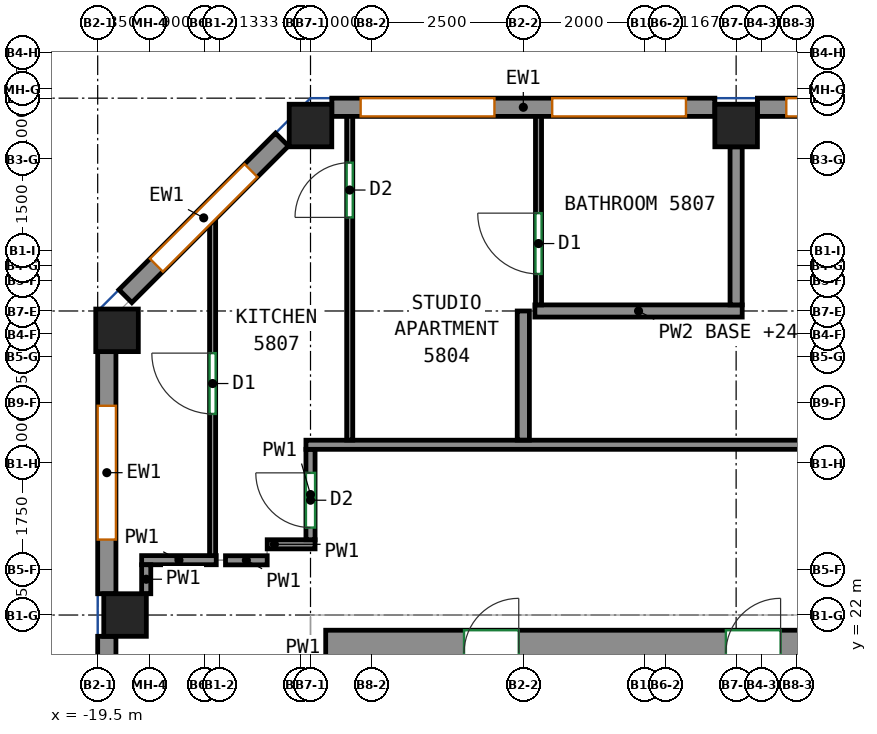
"""IFC4 building model, lengths in metres.
Left out: names, types, materials, properties, quantities, classifications, styles, units other than length and angle.
Written with IfcOpenShell. Run it as: python <this file> out.ifc"""

import sys

from ifc_helpers import new_model, si_unit, direction, frame, frame_2d, origin, origin_2d, place, context, subcontext, project, spatial, rectangle, extrude, source, transform, mapped, element, fill, save


model = new_model("IFC4")
c1 = context("Model", 3, precision=1e-05, world=origin(), true_north=direction((0.0, 1.0)))
c2 = subcontext(c1, "Body", "Model", "MODEL_VIEW")
j1 = project(units=[si_unit("LENGTHUNIT", "METRE"), si_unit("PLANEANGLEUNIT", "RADIAN")], contexts=[c1])
p1 = place(None, origin())
s1 = spatial("IfcSite", under=j1, at=p1, CompositionType="ELEMENT")
p2 = place(p1, origin())
s2 = spatial("IfcBuilding", under=s1, at=p2, CompositionType="ELEMENT")
p3 = place(p2, frame((0.0, 0.0, 242.4)))
s3 = spatial("IfcBuildingStorey", under=s2, at=p3, CompositionType="ELEMENT", Elevation=242.4)
m1 = source(origin(), c2, "Body", "SweptSolid", [
    extrude(rectangle(XDim=0.7, YDim=0.7, at=origin_2d()), origin(), (0.0, 0.0, 1.0), 3.12),
])
for number, where, z_axis, x_axis in (
    (1, (-19.182, 26.682, 0.0), (0.0, 0.0, 1.0), (1.0, 0.0, 0.0)),
    (2, (-19.05, 22.0, 0.0), (0.0, 0.0, 1.0), (1.0, 0.0, 0.0)),
    (3, (-16.0, 30.05, 0.0), (0.0, 0.0, 1.0), (1.0, 0.0, 0.0)),
    (4, (-9.0, 30.05, 0.0), (0.0, 0.0, 1.0), (1.0, 0.0, 0.0)),
):
    element("IfcColumn", number, at=place(p3, frame(where, z_axis=z_axis, x_axis=x_axis)), inside=s3, PredefinedType="COLUMN", context=c2, shape_type="MappedRepresentation", body=[
        mapped(m1, transform((0.0, 0.0, 0.0))),
    ])
m2 = source(origin(), c2, "Body", "SweptSolid", [
    extrude(rectangle(XDim=33.6, YDim=0.75, at=frame_2d((16.8, 0.0))), origin(), (0.0, 0.0, 1.0), 3.12),
])
p4 = place(p3, frame((-15.75, 21.375, 0.0), z_axis=(0.0, 0.0, 1.0), x_axis=(1.0, 0.0, 0.0)))
e5 = element("IfcWall", 5, at=p4, inside=s3, PredefinedType="SHEAR", context=c2, shape_type="MappedRepresentation", body=[
    mapped(m2, transform((0.0, 0.0, 0.0))),
])
p5 = place(p4, frame((6.581, 0.0, 0.0)))
e6 = element("IfcOpeningElement", 6, at=p5, cuts=e5, PredefinedType="OPENING", context=c2, shape_type="SweptSolid", body=[
    extrude(rectangle(XDim=0.9, YDim=2.1, at=frame_2d((0.45, 1.05))), frame((0.0, 0.385, 0.0), z_axis=(0.0, -1.0, 0.0), x_axis=(1.0, 0.0, 0.0)), (0.0, 0.0, 1.0), 0.77),
])
p6 = place(p4, frame((11.888, 0.0, 0.0)))
e7 = element("IfcOpeningElement", 7, at=p6, cuts=e5, PredefinedType="OPENING", context=c2, shape_type="SweptSolid", body=[
    extrude(rectangle(XDim=0.9, YDim=2.1, at=frame_2d((0.45, 1.05))), frame((0.0, 0.385, 0.0), z_axis=(0.0, -1.0, 0.0), x_axis=(1.0, 0.0, 0.0)), (0.0, 0.0, 1.0), 0.77),
])
p7 = place(p4, frame((17.315, 0.0, 0.0)))
e8 = element("IfcOpeningElement", 8, at=p7, cuts=e5, PredefinedType="OPENING", context=c2, shape_type="SweptSolid", body=[
    extrude(rectangle(XDim=0.9, YDim=2.1, at=frame_2d((0.45, 1.05))), frame((0.0, 0.385, 0.0), z_axis=(0.0, -1.0, 0.0), x_axis=(1.0, 0.0, 0.0)), (0.0, 0.0, 1.0), 0.77),
])
p8 = place(p4, frame((21.536, 0.0, 0.0)))
e9 = element("IfcOpeningElement", 9, at=p8, cuts=e5, PredefinedType="OPENING", context=c2, shape_type="SweptSolid", body=[
    extrude(rectangle(XDim=0.9, YDim=2.1, at=frame_2d((0.45, 1.05))), frame((0.0, 0.385, 0.0), z_axis=(0.0, -1.0, 0.0), x_axis=(1.0, 0.0, 0.0)), (0.0, 0.0, 1.0), 0.77),
])
p9 = place(p4, frame((24.537, 0.0, 0.0)))
e10 = element("IfcOpeningElement", 10, at=p9, cuts=e5, PredefinedType="OPENING", context=c2, shape_type="SweptSolid", body=[
    extrude(rectangle(XDim=0.9, YDim=2.1, at=frame_2d((0.45, 1.05))), frame((0.0, 0.385, 0.0), z_axis=(0.0, -1.0, 0.0), x_axis=(1.0, 0.0, 0.0)), (0.0, 0.0, 1.0), 0.77),
])
p10 = place(p4, frame((27.07, 0.0, 0.0)))
e11 = element("IfcOpeningElement", 11, at=p10, cuts=e5, PredefinedType="OPENING", context=c2, shape_type="SweptSolid", body=[
    extrude(rectangle(XDim=0.9, YDim=2.1, at=frame_2d((0.45, 1.05))), frame((0.0, 0.385, 0.0), z_axis=(0.0, -1.0, 0.0), x_axis=(1.0, 0.0, 0.0)), (0.0, 0.0, 1.0), 0.77),
])
p11 = place(p4, frame((2.275, 0.0, 0.0)))
e12 = element("IfcOpeningElement", 12, at=p11, cuts=e5, PredefinedType="OPENING", context=c2, shape_type="SweptSolid", body=[
    extrude(rectangle(XDim=0.9, YDim=2.1, at=frame_2d((0.45, 1.05))), frame((0.0, 0.385, 0.0), z_axis=(0.0, -1.0, 0.0), x_axis=(1.0, 0.0, 0.0)), (0.0, 0.0, 1.0), 0.77),
])
p12 = place(p4, frame((30.425, 0.0, 0.0)))
e13 = element("IfcOpeningElement", 13, at=p12, cuts=e5, PredefinedType="OPENING", context=c2, shape_type="SweptSolid", body=[
    extrude(rectangle(XDim=0.9, YDim=2.1, at=frame_2d((0.45, 1.05))), frame((0.0, 0.385, 0.0), z_axis=(0.0, -1.0, 0.0), x_axis=(1.0, 0.0, 0.0)), (0.0, 0.0, 1.0), 0.77),
])
m3 = source(origin(), c2, "Body", "SweptSolid", [
    extrude(rectangle(XDim=6.3, YDim=0.3, at=frame_2d((3.15, 0.0))), origin(), (0.0, 0.0, 1.0), 3.12),
])
p13 = place(p3, frame((-2.35, 30.35, 0.0), z_axis=(0.0, 0.0, 1.0), x_axis=(-1.0, 0.0, 0.0)))
e14 = element("IfcWall", 14, at=p13, inside=s3, PredefinedType="SOLIDWALL", context=c2, shape_type="MappedRepresentation", body=[
    mapped(m3, transform((0.0, 0.0, 0.0))),
])
p14 = place(p13, frame((0.475, 0.0, 0.8)))
e15 = element("IfcOpeningElement", 15, at=p14, cuts=e14, PredefinedType="OPENING", context=c2, shape_type="SweptSolid", body=[
    extrude(rectangle(XDim=2.2, YDim=2.05, at=frame_2d((1.1, 1.025))), frame((0.0, 0.16, 0.0), z_axis=(0.0, -1.0, 0.0), x_axis=(1.0, 0.0, 0.0)), (0.0, 0.0, 1.0), 0.32),
])
p15 = place(p13, frame((3.625, 0.0, 0.8)))
e16 = element("IfcOpeningElement", 16, at=p15, cuts=e14, PredefinedType="OPENING", context=c2, shape_type="SweptSolid", body=[
    extrude(rectangle(XDim=2.2, YDim=2.05, at=frame_2d((1.1, 1.025))), frame((0.0, 0.16, 0.0), z_axis=(0.0, -1.0, 0.0), x_axis=(1.0, 0.0, 0.0)), (0.0, 0.0, 1.0), 0.32),
])
p16 = place(p3, frame((-9.35, 30.35, 0.0), z_axis=(0.0, 0.0, 1.0), x_axis=(-1.0, 0.0, 0.0)))
e17 = element("IfcWall", 17, at=p16, inside=s3, PredefinedType="SOLIDWALL", context=c2, shape_type="MappedRepresentation", body=[
    mapped(m3, transform((0.0, 0.0, 0.0))),
])
p17 = place(p16, frame((0.475, 0.0, 0.8)))
e18 = element("IfcOpeningElement", 18, at=p17, cuts=e17, PredefinedType="OPENING", context=c2, shape_type="SweptSolid", body=[
    extrude(rectangle(XDim=2.2, YDim=2.05, at=frame_2d((1.1, 1.025))), frame((0.0, 0.16, 0.0), z_axis=(0.0, -1.0, 0.0), x_axis=(1.0, 0.0, 0.0)), (0.0, 0.0, 1.0), 0.32),
])
p18 = place(p16, frame((3.625, 0.0, 0.8)))
e19 = element("IfcOpeningElement", 19, at=p18, cuts=e17, PredefinedType="OPENING", context=c2, shape_type="SweptSolid", body=[
    extrude(rectangle(XDim=2.2, YDim=2.05, at=frame_2d((1.1, 1.025))), frame((0.0, 0.16, 0.0), z_axis=(0.0, -1.0, 0.0), x_axis=(1.0, 0.0, 0.0)), (0.0, 0.0, 1.0), 0.32),
])
m4 = source(origin(), c2, "Body", "SweptSolid", [
    extrude(rectangle(XDim=3.642, YDim=0.3, at=frame_2d((1.821, 0.0))), origin(), (0.0, 0.0, 1.0), 3.12),
])
p19 = place(p3, frame((-16.469, 29.819, 0.0), z_axis=(0.0, 0.0, 1.0), x_axis=(-0.707106781187, -0.707106781187, 0.0)))
e20 = element("IfcWall", 20, at=p19, inside=s3, PredefinedType="SOLIDWALL", context=c2, shape_type="MappedRepresentation", body=[
    mapped(m4, transform((0.0, 0.0, 0.0))),
])
p20 = place(p19, frame((0.721, 0.0, 0.8)))
e21 = element("IfcOpeningElement", 21, at=p20, cuts=e20, PredefinedType="OPENING", context=c2, shape_type="SweptSolid", body=[
    extrude(rectangle(XDim=2.2, YDim=2.05, at=frame_2d((1.1, 1.025))), frame((0.0, 0.16, 0.0), z_axis=(0.0, -1.0, 0.0), x_axis=(1.0, 0.0, 0.0)), (0.0, 0.0, 1.0), 0.32),
])
m5 = source(origin(), c2, "Body", "SweptSolid", [
    extrude(rectangle(XDim=3.982, YDim=0.3, at=frame_2d((1.991, 0.0))), origin(), (0.0, 0.0, 1.0), 3.12),
])
p21 = place(p3, frame((-19.35, 26.332, 0.0), z_axis=(0.0, 0.0, 1.0), x_axis=(0.0, -1.0, 0.0)))
e22 = element("IfcWall", 22, at=p21, inside=s3, PredefinedType="SOLIDWALL", context=c2, shape_type="MappedRepresentation", body=[
    mapped(m5, transform((0.0, 0.0, 0.0))),
])
p22 = place(p21, frame((0.891, 0.0, 0.8)))
e23 = element("IfcOpeningElement", 23, at=p22, cuts=e22, PredefinedType="OPENING", context=c2, shape_type="SweptSolid", body=[
    extrude(rectangle(XDim=2.2, YDim=2.05, at=frame_2d((1.1, 1.025))), frame((0.0, 0.16, 0.0), z_axis=(0.0, -1.0, 0.0), x_axis=(1.0, 0.0, 0.0)), (0.0, 0.0, 1.0), 0.32),
])
m6 = source(origin(), c2, "Body", "SweptSolid", [
    extrude(rectangle(XDim=13.3, YDim=0.3, at=frame_2d((6.65, 0.0))), origin(), (0.0, 0.0, 1.0), 3.12),
])
p23 = place(p3, frame((-19.35, 21.65, 0.0), z_axis=(0.0, 0.0, 1.0), x_axis=(0.0, -1.0, 0.0)))
e24 = element("IfcWall", 24, at=p23, inside=s3, PredefinedType="SOLIDWALL", context=c2, shape_type="MappedRepresentation", body=[
    mapped(m6, transform((0.0, 0.0, 0.0))),
])
p24 = place(p23, frame((0.562, 0.0, 0.8)))
e25 = element("IfcOpeningElement", 25, at=p24, cuts=e24, PredefinedType="OPENING", context=c2, shape_type="SweptSolid", body=[
    extrude(rectangle(XDim=2.2, YDim=2.05, at=frame_2d((1.1, 1.025))), frame((0.0, 0.16, 0.0), z_axis=(0.0, -1.0, 0.0), x_axis=(1.0, 0.0, 0.0)), (0.0, 0.0, 1.0), 0.32),
])
p25 = place(p23, frame((3.887, 0.0, 0.8)))
e26 = element("IfcOpeningElement", 26, at=p25, cuts=e24, PredefinedType="OPENING", context=c2, shape_type="SweptSolid", body=[
    extrude(rectangle(XDim=2.2, YDim=2.05, at=frame_2d((1.1, 1.025))), frame((0.0, 0.16, 0.0), z_axis=(0.0, -1.0, 0.0), x_axis=(1.0, 0.0, 0.0)), (0.0, 0.0, 1.0), 0.32),
])
p26 = place(p23, frame((7.212, 0.0, 0.8)))
e27 = element("IfcOpeningElement", 27, at=p26, cuts=e24, PredefinedType="OPENING", context=c2, shape_type="SweptSolid", body=[
    extrude(rectangle(XDim=2.2, YDim=2.05, at=frame_2d((1.1, 1.025))), frame((0.0, 0.16, 0.0), z_axis=(0.0, -1.0, 0.0), x_axis=(1.0, 0.0, 0.0)), (0.0, 0.0, 1.0), 0.32),
])
p27 = place(p23, frame((10.538, 0.0, 0.8)))
e28 = element("IfcOpeningElement", 28, at=p27, cuts=e24, PredefinedType="OPENING", context=c2, shape_type="SweptSolid", body=[
    extrude(rectangle(XDim=2.2, YDim=2.05, at=frame_2d((1.1, 1.025))), frame((0.0, 0.16, 0.0), z_axis=(0.0, -1.0, 0.0), x_axis=(1.0, 0.0, 0.0)), (0.0, 0.0, 1.0), 0.32),
])
p28 = place(p3, frame((-17.55, 22.902, 0.0), z_axis=(0.0, 0.0, 1.0), x_axis=(-1.0, 0.0, 0.0)))
e29 = element("IfcWall", 29, at=p28, inside=s3, PredefinedType="PARTITIONING", context=c2, shape_type="SweptSolid", body=[
    extrude(rectangle(XDim=1.227, YDim=0.15, at=frame_2d((0.614, 0.0))), origin(), (0.0, 0.0, 1.0), 3.12),
])
p29 = place(p3, frame((-18.702, 22.827, 0.0), z_axis=(0.0, 0.0, 1.0), x_axis=(0.0, -1.0, 0.0)))
e30 = element("IfcWall", 30, at=p29, inside=s3, PredefinedType="PARTITIONING", context=c2, shape_type="SweptSolid", body=[
    extrude(rectangle(XDim=0.477, YDim=0.15, at=frame_2d((0.238, 0.0))), origin(), (0.0, 0.0, 1.0), 3.12),
])
p30 = place(p3, frame((-16.712, 22.9, 0.0), z_axis=(0.0, 0.0, 1.0), x_axis=(-1.0, 0.0, 0.0)))
e31 = element("IfcWall", 31, at=p30, inside=s3, PredefinedType="PARTITIONING", context=c2, shape_type="SweptSolid", body=[
    extrude(rectangle(XDim=0.686, YDim=0.15, at=frame_2d((0.343, 0.0))), origin(), (0.0, 0.0, 1.0), 3.12),
])
p31 = place(p3, frame((-15.925, 23.163, 0.0), z_axis=(0.0, 0.0, 1.0), x_axis=(-1.0, 0.0, 0.0)))
e32 = element("IfcWall", 32, at=p31, inside=s3, PredefinedType="PARTITIONING", context=c2, shape_type="SweptSolid", body=[
    extrude(rectangle(XDim=0.787, YDim=0.15, at=frame_2d((0.394, 0.0))), origin(), (0.0, 0.0, 1.0), 3.12),
])
p32 = place(p3, frame((-16.0, 23.238, 0.0), z_axis=(0.0, 0.0, 1.0), x_axis=(0.0, 1.0, 0.0)))
e33 = element("IfcWall", 33, at=p32, inside=s3, PredefinedType="PARTITIONING", context=c2, shape_type="SweptSolid", body=[
    extrude(rectangle(XDim=1.487, YDim=0.15, at=frame_2d((0.744, 0.0))), origin(), (0.0, 0.0, 1.0), 3.12),
])
p33 = place(p32, frame((0.2, 0.0, 0.0)))
e34 = element("IfcOpeningElement", 34, at=p33, cuts=e33, PredefinedType="OPENING", context=c2, shape_type="SweptSolid", body=[
    extrude(rectangle(XDim=0.9, YDim=2.1, at=frame_2d((0.45, 1.05))), frame((0.0, 0.085, 0.0), z_axis=(0.0, -1.0, 0.0), x_axis=(1.0, 0.0, 0.0)), (0.0, 0.0, 1.0), 0.17),
])
p34 = place(p3, frame((-16.075, 24.8, 0.0), z_axis=(0.0, 0.0, 1.0), x_axis=(1.0, 0.0, 0.0)))
e35 = element("IfcWall", 35, at=p34, inside=s3, PredefinedType="PARTITIONING", context=c2, shape_type="SweptSolid", body=[
    extrude(rectangle(XDim=36.073, YDim=0.15, at=frame_2d((18.037, 0.0))), origin(), (0.0, 0.0, 1.0), 3.12),
])
p35 = place(p34, frame((14.274, 0.0, 0.0)))
e36 = element("IfcOpeningElement", 36, at=p35, cuts=e35, PredefinedType="OPENING", context=c2, shape_type="SweptSolid", body=[
    extrude(rectangle(XDim=0.9, YDim=2.1, at=frame_2d((0.45, 1.05))), frame((0.0, 0.085, 0.0), z_axis=(0.0, -1.0, 0.0), x_axis=(1.0, 0.0, 0.0)), (0.0, 0.0, 1.0), 0.17),
])
p36 = place(p34, frame((28.875, 0.0, 0.0)))
e37 = element("IfcOpeningElement", 37, at=p36, cuts=e35, PredefinedType="OPENING", context=c2, shape_type="SweptSolid", body=[
    extrude(rectangle(XDim=1.0, YDim=2.1, at=frame_2d((0.5, 1.05))), frame((0.0, 0.085, 0.0), z_axis=(0.0, -1.0, 0.0), x_axis=(1.0, 0.0, 0.0)), (0.0, 0.0, 1.0), 0.17),
])
p37 = place(p3, frame((-12.5, 27.0, 0.0), z_axis=(0.0, 0.0, 1.0), x_axis=(0.0, -1.0, 0.0)))
e38 = element("IfcWall", 38, at=p37, inside=s3, PredefinedType="PARTITIONING", context=c2, shape_type="SweptSolid", body=[
    extrude(rectangle(XDim=2.123, YDim=0.2, at=frame_2d((1.062, 0.0))), origin(), (0.0, 0.0, 1.0), 3.12),
])
p38 = place(p3, frame((-8.9, 27.0, 0.0), z_axis=(0.0, 0.0, 1.0), x_axis=(-1.0, 0.0, 0.0)))
e39 = element("IfcWall", 39, at=p38, inside=s3, PredefinedType="PARTITIONING", context=c2, shape_type="SweptSolid", body=[
    extrude(rectangle(XDim=3.41, YDim=0.2, at=frame_2d((1.705, 0.0))), origin(), (0.0, 0.0, 1.0), 2.57),
])
p39 = place(p3, frame((-9.0, 27.1, 0.0), z_axis=(0.0, 0.0, 1.0), x_axis=(0.0, 1.0, 0.0)))
e40 = element("IfcWall", 40, at=p39, inside=s3, PredefinedType="PARTITIONING", context=c2, shape_type="SweptSolid", body=[
    extrude(rectangle(XDim=2.6, YDim=0.2, at=frame_2d((1.3, 0.0))), origin(), (0.0, 0.0, 1.0), 3.12),
])
p40 = place(p3, frame((-17.61, 22.977, 0.0), z_axis=(0.0, 0.0, 1.0), x_axis=(0.0, 1.0, 0.0)))
e41 = element("IfcWall", 41, at=p40, inside=s3, PredefinedType="PARTITIONING", context=c2, shape_type="SweptSolid", body=[
    extrude(rectangle(XDim=5.559, YDim=0.1, at=frame_2d((2.779, 0.0))), origin(), (0.0, 0.0, 1.0), 3.12),
])
p41 = place(p40, frame((2.33, 0.0, 0.0)))
e42 = element("IfcOpeningElement", 42, at=p41, cuts=e41, PredefinedType="OPENING", context=c2, shape_type="SweptSolid", body=[
    extrude(rectangle(XDim=1.0, YDim=2.1, at=frame_2d((0.5, 1.05))), frame((0.0, 0.06, 0.0), z_axis=(0.0, -1.0, 0.0), x_axis=(1.0, 0.0, 0.0)), (0.0, 0.0, 1.0), 0.12),
])
p42 = place(p3, frame((-15.355, 24.877, 0.0), z_axis=(0.0, 0.0, 1.0), x_axis=(0.0, 1.0, 0.0)))
e43 = element("IfcWall", 43, at=p42, inside=s3, PredefinedType="PARTITIONING", context=c2, shape_type="SweptSolid", body=[
    extrude(rectangle(XDim=5.373, YDim=0.1, at=frame_2d((2.687, 0.0))), origin(), (0.0, 0.0, 1.0), 3.12),
])
p43 = place(p42, frame((3.662, 0.0, 0.0)))
e44 = element("IfcOpeningElement", 44, at=p43, cuts=e43, PredefinedType="OPENING", context=c2, shape_type="SweptSolid", body=[
    extrude(rectangle(XDim=0.9, YDim=2.1, at=frame_2d((0.45, 1.05))), frame((0.0, 0.06, 0.0), z_axis=(0.0, -1.0, 0.0), x_axis=(1.0, 0.0, 0.0)), (0.0, 0.0, 1.0), 0.12),
])
p44 = place(p3, frame((-12.25, 27.1, 0.0), z_axis=(0.0, 0.0, 1.0), x_axis=(0.0, 1.0, 0.0)))
e45 = element("IfcWall", 45, at=p44, inside=s3, PredefinedType="PARTITIONING", context=c2, shape_type="SweptSolid", body=[
    extrude(rectangle(XDim=3.15, YDim=0.1, at=frame_2d((1.575, 0.0))), origin(), (0.0, 0.0, 1.0), 3.12),
])
p45 = place(p44, frame((0.509, 0.0, 0.0)))
e46 = element("IfcOpeningElement", 46, at=p45, cuts=e45, PredefinedType="OPENING", context=c2, shape_type="SweptSolid", body=[
    extrude(rectangle(XDim=1.0, YDim=2.1, at=frame_2d((0.5, 1.05))), frame((0.0, 0.06, 0.0), z_axis=(0.0, -1.0, 0.0), x_axis=(1.0, 0.0, 0.0)), (0.0, 0.0, 1.0), 0.12),
])
p46 = place(p15, origin())
e47 = element("IfcWindow", 47, at=p46, inside=s3, PartitioningType="SINGLE_PANEL", PredefinedType="WINDOW", context=c2, shape_type="SweptSolid", body=[
    extrude(rectangle(XDim=2.2, YDim=2.05, at=frame_2d((1.1, 1.025))), frame((0.0, 0.03, 0.0), z_axis=(0.0, -1.0, 0.0), x_axis=(1.0, 0.0, 0.0)), (0.0, 0.0, 1.0), 0.06),
])
fill(e16, e47)
p47 = place(p17, origin())
e48 = element("IfcWindow", 48, at=p47, inside=s3, PartitioningType="SINGLE_PANEL", PredefinedType="WINDOW", context=c2, shape_type="SweptSolid", body=[
    extrude(rectangle(XDim=2.2, YDim=2.05, at=frame_2d((1.1, 1.025))), frame((0.0, 0.03, 0.0), z_axis=(0.0, -1.0, 0.0), x_axis=(1.0, 0.0, 0.0)), (0.0, 0.0, 1.0), 0.06),
])
fill(e18, e48)
p48 = place(p18, origin())
e49 = element("IfcWindow", 49, at=p48, inside=s3, PartitioningType="SINGLE_PANEL", PredefinedType="WINDOW", context=c2, shape_type="SweptSolid", body=[
    extrude(rectangle(XDim=2.2, YDim=2.05, at=frame_2d((1.1, 1.025))), frame((0.0, 0.03, 0.0), z_axis=(0.0, -1.0, 0.0), x_axis=(1.0, 0.0, 0.0)), (0.0, 0.0, 1.0), 0.06),
])
fill(e19, e49)
p49 = place(p20, origin())
e50 = element("IfcWindow", 50, at=p49, inside=s3, PartitioningType="SINGLE_PANEL", PredefinedType="WINDOW", context=c2, shape_type="SweptSolid", body=[
    extrude(rectangle(XDim=2.2, YDim=2.05, at=frame_2d((1.1, 1.025))), frame((0.0, 0.03, 0.0), z_axis=(0.0, -1.0, 0.0), x_axis=(1.0, 0.0, 0.0)), (0.0, 0.0, 1.0), 0.06),
])
fill(e21, e50)
p50 = place(p22, origin())
e51 = element("IfcWindow", 51, at=p50, inside=s3, PartitioningType="SINGLE_PANEL", PredefinedType="WINDOW", context=c2, shape_type="SweptSolid", body=[
    extrude(rectangle(XDim=2.2, YDim=2.05, at=frame_2d((1.1, 1.025))), frame((0.0, 0.03, 0.0), z_axis=(0.0, -1.0, 0.0), x_axis=(1.0, 0.0, 0.0)), (0.0, 0.0, 1.0), 0.06),
])
fill(e23, e51)
p51 = place(p33, origin())
e52 = element("IfcDoor", 52, at=p51, inside=s3, OperationType="SINGLE_SWING_RIGHT", PredefinedType="DOOR", context=c2, shape_type="SweptSolid", body=[
    extrude(rectangle(XDim=0.9, YDim=2.1, at=frame_2d((0.45, 1.05))), frame((0.0, 0.025, 0.0), z_axis=(0.0, -1.0, 0.0), x_axis=(1.0, 0.0, 0.0)), (0.0, 0.0, 1.0), 0.05),
])
fill(e34, e52)
p52 = place(p41, origin())
e53 = element("IfcDoor", 53, at=p52, inside=s3, OperationType="SINGLE_SWING_RIGHT", PredefinedType="DOOR", context=c2, shape_type="SweptSolid", body=[
    extrude(rectangle(XDim=1.0, YDim=2.1, at=frame_2d((0.5, 1.05))), frame((0.0, 0.025, 0.0), z_axis=(0.0, -1.0, 0.0), x_axis=(1.0, 0.0, 0.0)), (0.0, 0.0, 1.0), 0.05),
])
fill(e42, e53)
p53 = place(p45, origin())
e54 = element("IfcDoor", 54, at=p53, inside=s3, OperationType="SINGLE_SWING_RIGHT", PredefinedType="DOOR", context=c2, shape_type="SweptSolid", body=[
    extrude(rectangle(XDim=1.0, YDim=2.1, at=frame_2d((0.5, 1.05))), frame((0.0, 0.025, 0.0), z_axis=(0.0, -1.0, 0.0), x_axis=(1.0, 0.0, 0.0)), (0.0, 0.0, 1.0), 0.05),
])
fill(e46, e54)
p54 = place(p43, origin())
e55 = element("IfcDoor", 55, at=p54, inside=s3, OperationType="SINGLE_SWING_LEFT", PredefinedType="DOOR", context=c2, shape_type="SweptSolid", body=[
    extrude(rectangle(XDim=0.9, YDim=2.1, at=frame_2d((0.45, 1.05))), frame((0.0, 0.025, 0.0), z_axis=(0.0, -1.0, 0.0), x_axis=(1.0, 0.0, 0.0)), (0.0, 0.0, 1.0), 0.05),
])
fill(e44, e55)
save(model, sys.argv[1])
